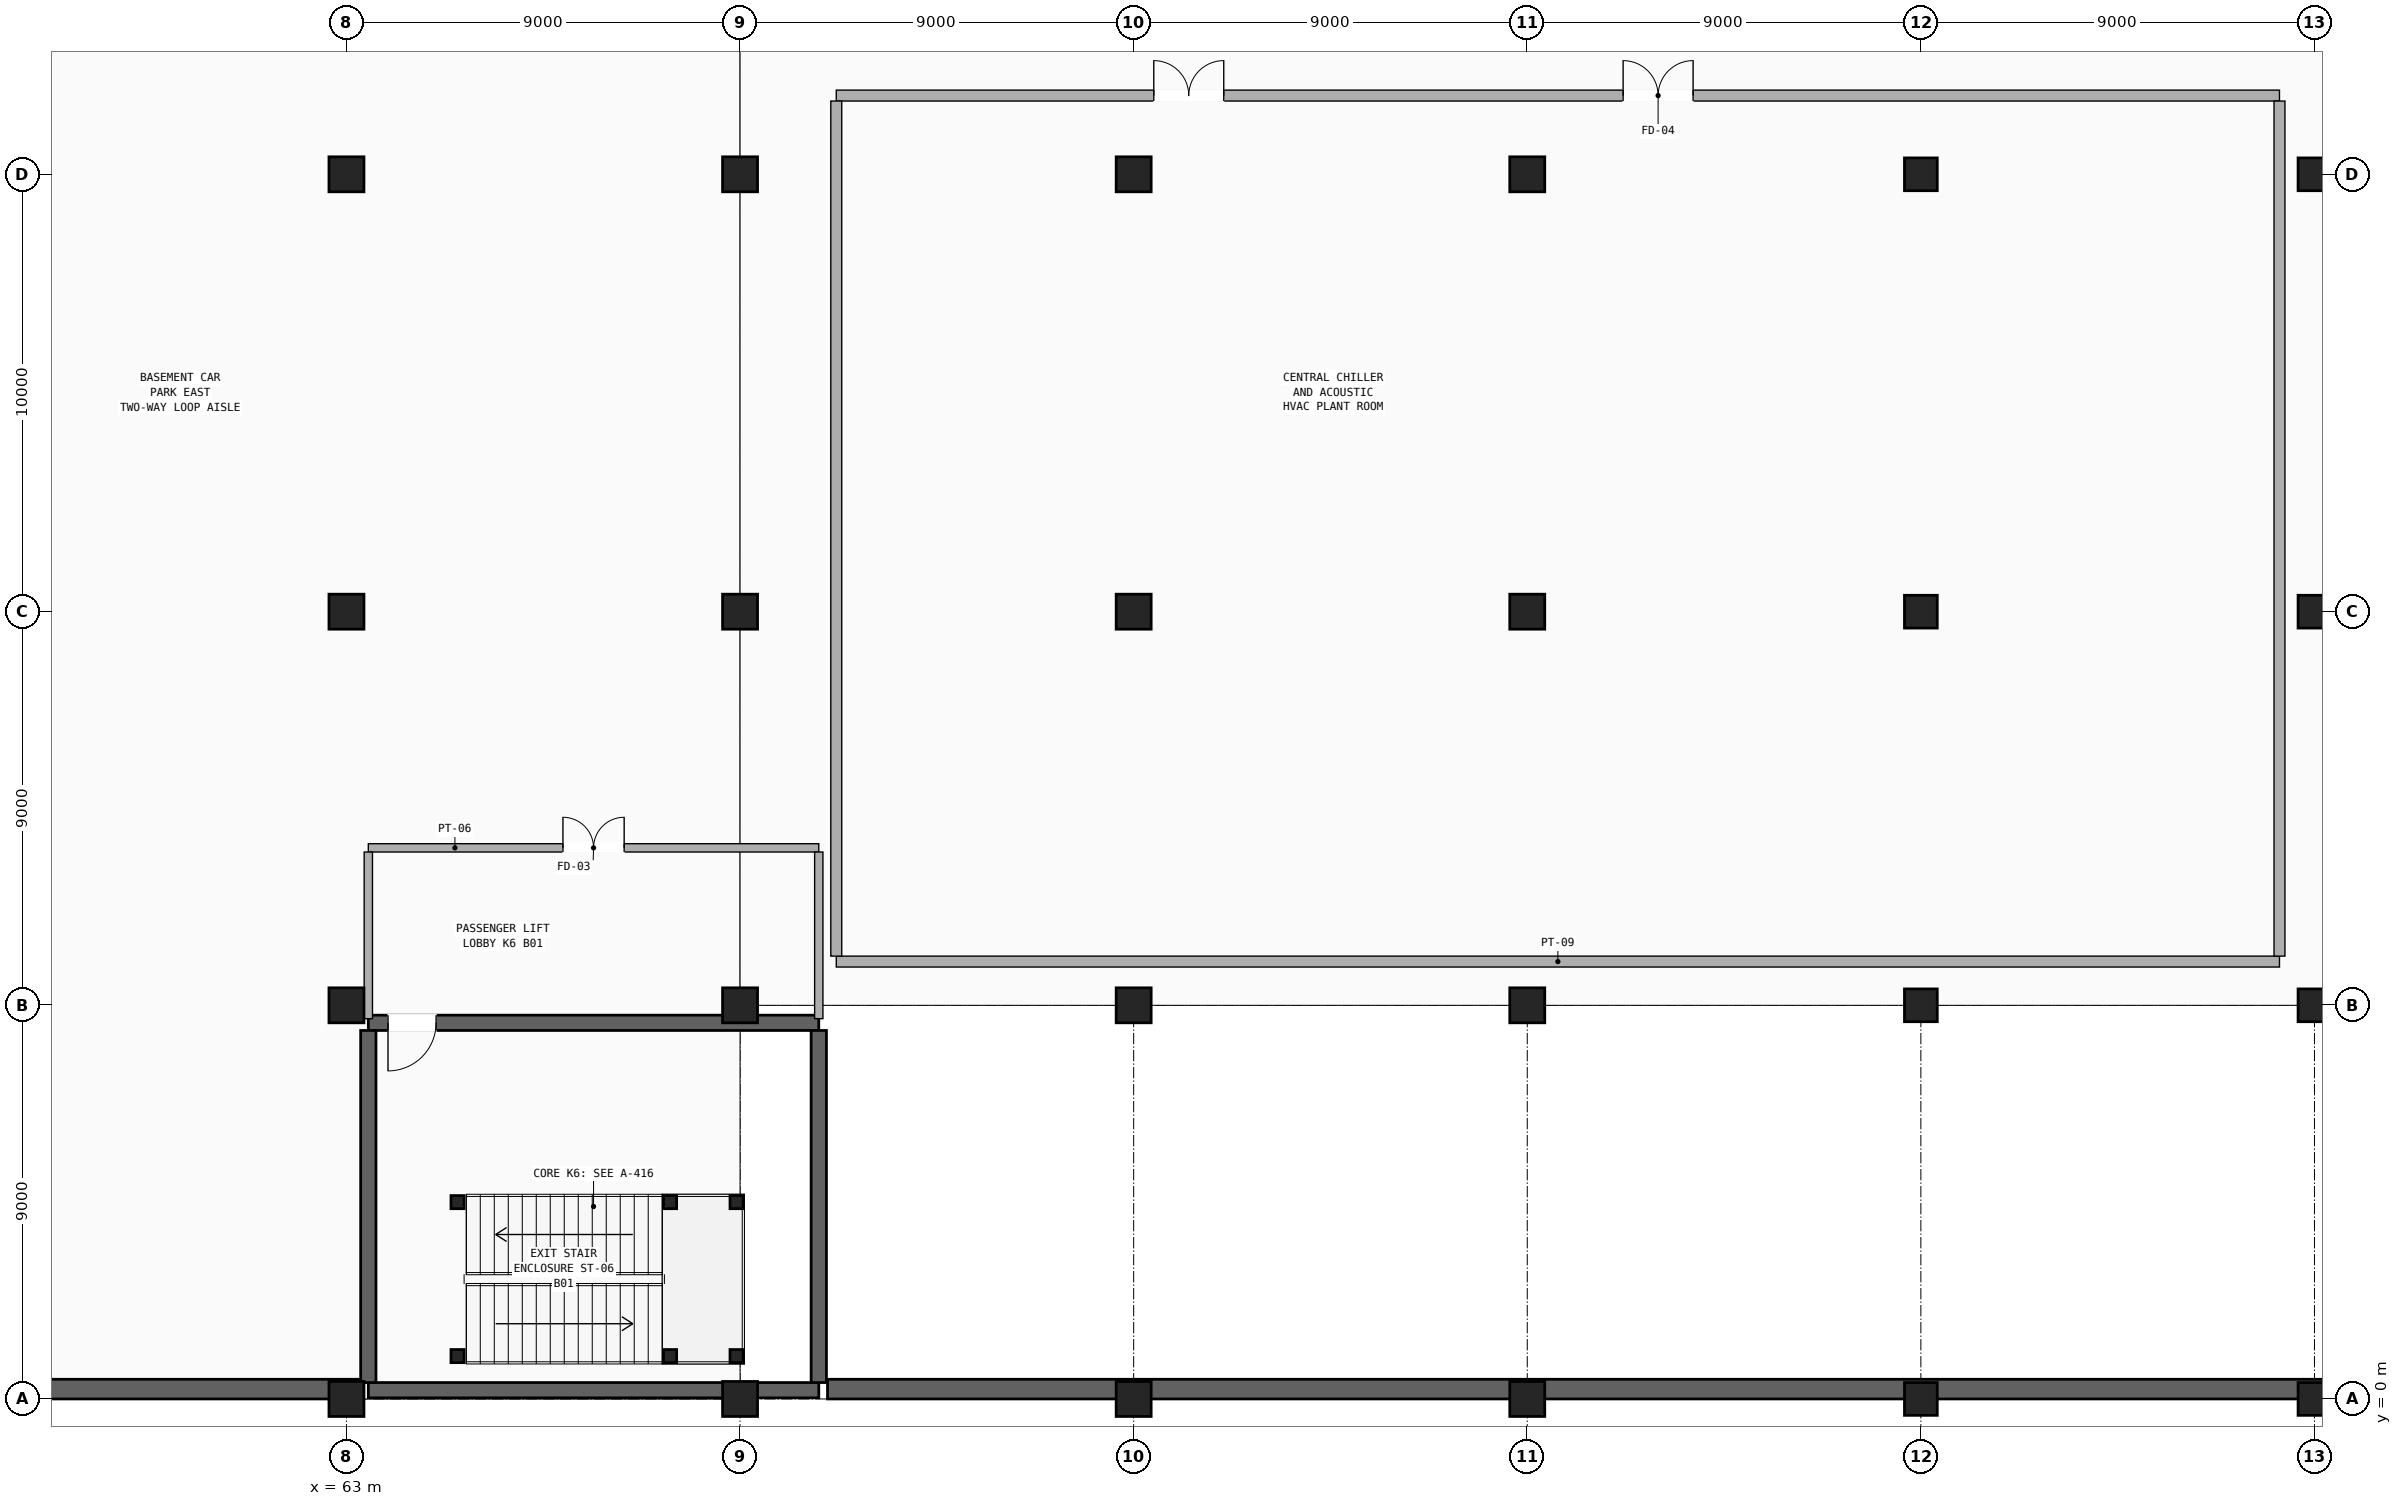
"""IFC4 building model, lengths in metres.
Left out: names, types, materials, properties, quantities, classifications, styles, units other than length and angle.
Written with IfcOpenShell. Run it as: python <this file> out.ifc"""

import sys

from ifc_helpers import new_model, si_unit, direction, frame, frame_2d, origin, origin_2d, place, context, subcontext, project, spatial, rectangle, hollow_rectangle, extrude, element, fill, save


model = new_model("IFC4")
c1 = context("Model", 3, precision=1e-05, world=origin(), true_north=direction((0.0, 1.0)))
c2 = subcontext(c1, "Body", "Model", "MODEL_VIEW")
j1 = project(units=[si_unit("LENGTHUNIT", "METRE"), si_unit("PLANEANGLEUNIT", "RADIAN")], contexts=[c1])
p1 = place(None, origin())
s1 = spatial("IfcSite", under=j1, at=p1, CompositionType="ELEMENT")
p2 = place(p1, origin())
s2 = spatial("IfcBuilding", under=s1, at=p2, CompositionType="ELEMENT")
p3 = place(p2, frame((0.0, 0.0, -5.1)))
s3 = spatial("IfcBuildingStorey", under=s2, at=p3, CompositionType="ELEMENT", Elevation=-5.1)
for number, where, z_axis, x_axis in (
    (1, (81.0, 0.0, 0.0), (0.0, 0.0, 1.0), (1.0, 0.0, 0.0)),
    (2, (81.0, 9.0, 0.0), (0.0, 0.0, 1.0), (1.0, 0.0, 0.0)),
    (3, (81.0, 18.0, 0.0), (0.0, 0.0, 1.0), (1.0, 0.0, 0.0)),
    (4, (81.0, 28.0, 0.0), (0.0, 0.0, 1.0), (1.0, 0.0, 0.0)),
    (5, (90.0, 0.0, 0.0), (0.0, 0.0, 1.0), (1.0, 0.0, 0.0)),
    (6, (90.0, 9.0, 0.0), (0.0, 0.0, 1.0), (1.0, 0.0, 0.0)),
    (7, (90.0, 18.0, 0.0), (0.0, 0.0, 1.0), (1.0, 0.0, 0.0)),
    (8, (90.0, 28.0, 0.0), (0.0, 0.0, 1.0), (1.0, 0.0, 0.0)),
):
    element("IfcColumn", number, at=place(p3, frame(where, z_axis=z_axis, x_axis=x_axis)), inside=s3, PredefinedType="COLUMN", context=c2, shape_type="SweptSolid", body=[
        extrude(rectangle(XDim=0.8, YDim=0.8, at=origin_2d()), origin(), (0.0, 0.0, 1.0), 5.1),
    ])
for number, where, z_axis, x_axis in (
    (9, (99.0, 0.0, 0.0), (0.0, 0.0, 1.0), (1.0, 0.0, 0.0)),
    (10, (99.0, 9.0, 0.0), (0.0, 0.0, 1.0), (1.0, 0.0, 0.0)),
    (11, (99.0, 18.0, 0.0), (0.0, 0.0, 1.0), (1.0, 0.0, 0.0)),
    (12, (99.0, 28.0, 0.0), (0.0, 0.0, 1.0), (1.0, 0.0, 0.0)),
    (13, (108.0, 0.0, 0.0), (0.0, 0.0, 1.0), (1.0, 0.0, 0.0)),
    (14, (108.0, 9.0, 0.0), (0.0, 0.0, 1.0), (1.0, 0.0, 0.0)),
    (15, (108.0, 18.0, 0.0), (0.0, 0.0, 1.0), (1.0, 0.0, 0.0)),
    (16, (108.0, 28.0, 0.0), (0.0, 0.0, 1.0), (1.0, 0.0, 0.0)),
):
    element("IfcColumn", number, at=place(p3, frame(where, z_axis=z_axis, x_axis=x_axis)), inside=s3, PredefinedType="COLUMN", context=c2, shape_type="SweptSolid", body=[
        extrude(rectangle(XDim=0.75, YDim=0.75, at=origin_2d()), origin(), (0.0, 0.0, 1.0), 5.1),
    ])
for number, where, z_axis, x_axis in (
    (17, (63.0, 0.0, 0.0), (0.0, 0.0, 1.0), (1.0, 0.0, 0.0)),
    (18, (63.0, 9.0, 0.0), (0.0, 0.0, 1.0), (1.0, 0.0, 0.0)),
    (19, (63.0, 18.0, 0.0), (0.0, 0.0, 1.0), (1.0, 0.0, 0.0)),
    (20, (63.0, 28.0, 0.0), (0.0, 0.0, 1.0), (1.0, 0.0, 0.0)),
    (21, (72.0, 0.0, 0.0), (0.0, 0.0, 1.0), (1.0, 0.0, 0.0)),
    (22, (72.0, 9.0, 0.0), (0.0, 0.0, 1.0), (1.0, 0.0, 0.0)),
    (23, (72.0, 18.0, 0.0), (0.0, 0.0, 1.0), (1.0, 0.0, 0.0)),
    (24, (72.0, 28.0, 0.0), (0.0, 0.0, 1.0), (1.0, 0.0, 0.0)),
):
    element("IfcColumn", number, at=place(p3, frame(where, z_axis=z_axis, x_axis=x_axis)), inside=s3, PredefinedType="COLUMN", context=c2, shape_type="SweptSolid", body=[
        extrude(rectangle(XDim=0.8, YDim=0.8, at=origin_2d()), origin(), (0.0, 0.0, 1.0), 5.1),
    ])
p4 = place(p3, frame((0.0, 0.225, 0.0), z_axis=(0.0, 0.0, 1.0), x_axis=(1.0, 0.0, 0.0)))
e25 = element("IfcWall", 25, at=p4, inside=s3, PredefinedType="SOLIDWALL", context=c2, shape_type="SweptSolid", body=[
    extrude(rectangle(XDim=63.3, YDim=0.45, at=frame_2d((31.65, 0.0))), origin(), (0.0, 0.0, 1.0), 5.1),
])
p5 = place(p3, frame((74.0, 0.225, 0.0), z_axis=(0.0, 0.0, 1.0), x_axis=(1.0, 0.0, 0.0)))
e26 = element("IfcWall", 26, at=p5, inside=s3, PredefinedType="SOLIDWALL", context=c2, shape_type="SweptSolid", body=[
    extrude(rectangle(XDim=90.0, YDim=0.45, at=frame_2d((45.0, 0.0))), origin(), (0.0, 0.0, 1.0), 5.1),
])
p6 = place(p3, frame((63.5, 0.2, 0.0), z_axis=(0.0, 0.0, 1.0), x_axis=(1.0, 0.0, 0.0)))
e27 = element("IfcWall", 27, at=p6, inside=s3, PredefinedType="SHEAR", context=c2, shape_type="SweptSolid", body=[
    extrude(rectangle(XDim=10.3, YDim=0.35, at=frame_2d((5.15, 0.0))), origin(), (0.0, 0.0, 1.0), 5.1),
])
p7 = place(p3, frame((63.5, 8.6, 0.0), z_axis=(0.0, 0.0, 1.0), x_axis=(1.0, 0.0, 0.0)))
e28 = element("IfcWall", 28, at=p7, inside=s3, PredefinedType="SHEAR", context=c2, shape_type="SweptSolid", body=[
    extrude(rectangle(XDim=10.3, YDim=0.35, at=frame_2d((5.15, 0.0))), origin(), (0.0, 0.0, 1.0), 5.1),
])
p8 = place(p7, frame((0.45, 0.0, 0.0)))
e29 = element("IfcOpeningElement", 29, at=p8, cuts=e28, PredefinedType="OPENING", context=c2, shape_type="SweptSolid", body=[
    extrude(rectangle(XDim=1.1, YDim=2.2, at=frame_2d((0.55, 1.1))), frame((0.0, 0.185, 0.0), z_axis=(0.0, -1.0, 0.0), x_axis=(1.0, 0.0, 0.0)), (0.0, 0.0, 1.0), 0.37),
])
for number, where, z_axis, x_axis in (
    (30, (63.5, 0.375, 0.0), (0.0, 0.0, 1.0), (0.0, 1.0, 0.0)),
    (31, (73.8, 0.375, 0.0), (0.0, 0.0, 1.0), (0.0, 1.0, 0.0)),
):
    element("IfcWall", number, at=place(p3, frame(where, z_axis=z_axis, x_axis=x_axis)), inside=s3, PredefinedType="SHEAR", context=c2, shape_type="SweptSolid", body=[
        extrude(rectangle(XDim=8.05, YDim=0.35, at=frame_2d((4.025, 0.0))), origin(), (0.0, 0.0, 1.0), 5.1),
    ])
for number, where, z_axis, x_axis in (
    (32, (65.54, 0.98, 0.0), (0.0, 0.0, 1.0), (1.0, 0.0, 0.0)),
    (33, (65.54, 4.5, 0.0), (0.0, 0.0, 1.0), (1.0, 0.0, 0.0)),
    (34, (70.4, 0.98, 0.0), (0.0, 0.0, 1.0), (1.0, 0.0, 0.0)),
    (35, (70.4, 4.5, 0.0), (0.0, 0.0, 1.0), (1.0, 0.0, 0.0)),
    (36, (71.92, 0.98, 0.0), (0.0, 0.0, 1.0), (1.0, 0.0, 0.0)),
    (37, (71.92, 4.5, 0.0), (0.0, 0.0, 1.0), (1.0, 0.0, 0.0)),
):
    element("IfcColumn", number, at=place(p3, frame(where, z_axis=z_axis, x_axis=x_axis)), inside=s3, PredefinedType="COLUMN", context=c2, shape_type="SweptSolid", body=[
        extrude(hollow_rectangle(XDim=0.3, YDim=0.3, WallThickness=0.016, InnerFilletRadius=0.016, OuterFilletRadius=0.032, at=origin_2d()), origin(), (0.0, 0.0, 1.0), 5.1),
    ])
p9 = place(p3, frame((63.5, 12.6, 0.0), z_axis=(0.0, 0.0, 1.0), x_axis=(1.0, 0.0, 0.0)))
e38 = element("IfcWall", 38, at=p9, inside=s3, PredefinedType="PARTITIONING", context=c2, shape_type="SweptSolid", body=[
    extrude(rectangle(XDim=10.3, YDim=0.19, at=frame_2d((5.15, 0.0))), origin(), (0.0, 0.0, 1.0), 4.11),
])
p10 = place(p9, frame((4.45, 0.0, 0.0)))
e39 = element("IfcOpeningElement", 39, at=p10, cuts=e38, PredefinedType="OPENING", context=c2, shape_type="SweptSolid", body=[
    extrude(rectangle(XDim=1.4, YDim=2.2, at=frame_2d((0.7, 1.1))), frame((0.0, 0.105, 0.0), z_axis=(0.0, -1.0, 0.0), x_axis=(1.0, 0.0, 0.0)), (0.0, 0.0, 1.0), 0.21),
])
p11 = place(p3, frame((63.5, 8.695, 0.0), z_axis=(0.0, 0.0, 1.0), x_axis=(0.0, 1.0, 0.0)))
e40 = element("IfcWall", 40, at=p11, inside=s3, PredefinedType="PARTITIONING", context=c2, shape_type="SweptSolid", body=[
    extrude(rectangle(XDim=3.81, YDim=0.19, at=frame_2d((1.905, 0.0))), origin(), (0.0, 0.0, 1.0), 4.01),
])
p12 = place(p3, frame((73.8, 8.695, 0.0), z_axis=(0.0, 0.0, 1.0), x_axis=(0.0, 1.0, 0.0)))
e41 = element("IfcWall", 41, at=p12, inside=s3, PredefinedType="PARTITIONING", context=c2, shape_type="SweptSolid", body=[
    extrude(rectangle(XDim=3.81, YDim=0.19, at=frame_2d((1.905, 0.0))), origin(), (0.0, 0.0, 1.0), 3.76),
])
p13 = place(p3, frame((74.2, 10.0, 0.0), z_axis=(0.0, 0.0, 1.0), x_axis=(1.0, 0.0, 0.0)))
e42 = element("IfcWall", 42, at=p13, inside=s3, PredefinedType="PARTITIONING", context=c2, shape_type="SweptSolid", body=[
    extrude(rectangle(XDim=33.0, YDim=0.25, at=frame_2d((16.5, 0.0))), origin(), (0.0, 0.0, 1.0), 4.06),
])
p14 = place(p3, frame((74.2, 29.8, 0.0), z_axis=(0.0, 0.0, 1.0), x_axis=(1.0, 0.0, 0.0)))
e43 = element("IfcWall", 43, at=p14, inside=s3, PredefinedType="PARTITIONING", context=c2, shape_type="SweptSolid", body=[
    extrude(rectangle(XDim=33.0, YDim=0.25, at=frame_2d((16.5, 0.0))), origin(), (0.0, 0.0, 1.0), 3.91),
])
p15 = place(p14, frame((17.992, 0.0, 0.0)))
e44 = element("IfcOpeningElement", 44, at=p15, cuts=e43, PredefinedType="OPENING", context=c2, shape_type="SweptSolid", body=[
    extrude(rectangle(XDim=1.6, YDim=2.25, at=frame_2d((0.8, 1.125))), frame((0.0, 0.135, 0.0), z_axis=(0.0, -1.0, 0.0), x_axis=(1.0, 0.0, 0.0)), (0.0, 0.0, 1.0), 0.27),
])
p16 = place(p14, frame((7.26, 0.0, 0.0)))
e45 = element("IfcOpeningElement", 45, at=p16, cuts=e43, PredefinedType="OPENING", context=c2, shape_type="SweptSolid", body=[
    extrude(rectangle(XDim=1.6, YDim=2.25, at=frame_2d((0.8, 1.125))), frame((0.0, 0.135, 0.0), z_axis=(0.0, -1.0, 0.0), x_axis=(1.0, 0.0, 0.0)), (0.0, 0.0, 1.0), 0.27),
])
p17 = place(p3, frame((74.2, 10.125, 0.0), z_axis=(0.0, 0.0, 1.0), x_axis=(0.0, 1.0, 0.0)))
e46 = element("IfcWall", 46, at=p17, inside=s3, PredefinedType="PARTITIONING", context=c2, shape_type="SweptSolid", body=[
    extrude(rectangle(XDim=19.55, YDim=0.25, at=frame_2d((9.775, 0.0))), origin(), (0.0, 0.0, 1.0), 3.86),
])
p18 = place(p3, frame((107.2, 10.125, 0.0), z_axis=(0.0, 0.0, 1.0), x_axis=(0.0, 1.0, 0.0)))
e47 = element("IfcWall", 47, at=p18, inside=s3, PredefinedType="PARTITIONING", context=c2, shape_type="SweptSolid", body=[
    extrude(rectangle(XDim=19.55, YDim=0.25, at=frame_2d((9.775, 0.0))), origin(), (0.0, 0.0, 1.0), 3.76),
])
p19 = place(p8, frame((1.1, 0.0, 0.0), z_axis=(0.0, 0.0, 1.0), x_axis=(-1.0, 0.0, 0.0)))
e48 = element("IfcDoor", 48, at=p19, inside=s3, OperationType="SINGLE_SWING_RIGHT", PredefinedType="DOOR", context=c2, shape_type="SweptSolid", body=[
    extrude(rectangle(XDim=1.1, YDim=2.2, at=frame_2d((0.55, 1.1))), frame((0.0, 0.025, 0.0), z_axis=(0.0, -1.0, 0.0), x_axis=(1.0, 0.0, 0.0)), (0.0, 0.0, 1.0), 0.05),
])
fill(e29, e48)
p20 = place(p10, origin())
e49 = element("IfcDoor", 49, at=p20, inside=s3, OperationType="DOUBLE_DOOR_SINGLE_SWING", PredefinedType="DOOR", context=c2, shape_type="SweptSolid", body=[
    extrude(rectangle(XDim=1.4, YDim=2.2, at=frame_2d((0.7, 1.1))), frame((0.0, 0.025, 0.0), z_axis=(0.0, -1.0, 0.0), x_axis=(1.0, 0.0, 0.0)), (0.0, 0.0, 1.0), 0.05),
])
fill(e39, e49)
p21 = place(p15, origin())
e50 = element("IfcDoor", 50, at=p21, inside=s3, OperationType="DOUBLE_DOOR_SINGLE_SWING", PredefinedType="DOOR", context=c2, shape_type="SweptSolid", body=[
    extrude(rectangle(XDim=1.6, YDim=2.25, at=frame_2d((0.8, 1.125))), frame((0.0, 0.025, 0.0), z_axis=(0.0, -1.0, 0.0), x_axis=(1.0, 0.0, 0.0)), (0.0, 0.0, 1.0), 0.05),
])
fill(e44, e50)
p22 = place(p16, origin())
e51 = element("IfcDoor", 51, at=p22, inside=s3, OperationType="DOUBLE_DOOR_SINGLE_SWING", PredefinedType="DOOR", context=c2, shape_type="SweptSolid", body=[
    extrude(rectangle(XDim=1.6, YDim=2.25, at=frame_2d((0.8, 1.125))), frame((0.0, 0.025, 0.0), z_axis=(0.0, -1.0, 0.0), x_axis=(1.0, 0.0, 0.0)), (0.0, 0.0, 1.0), 0.05),
])
fill(e45, e51)
save(model, sys.argv[1])
